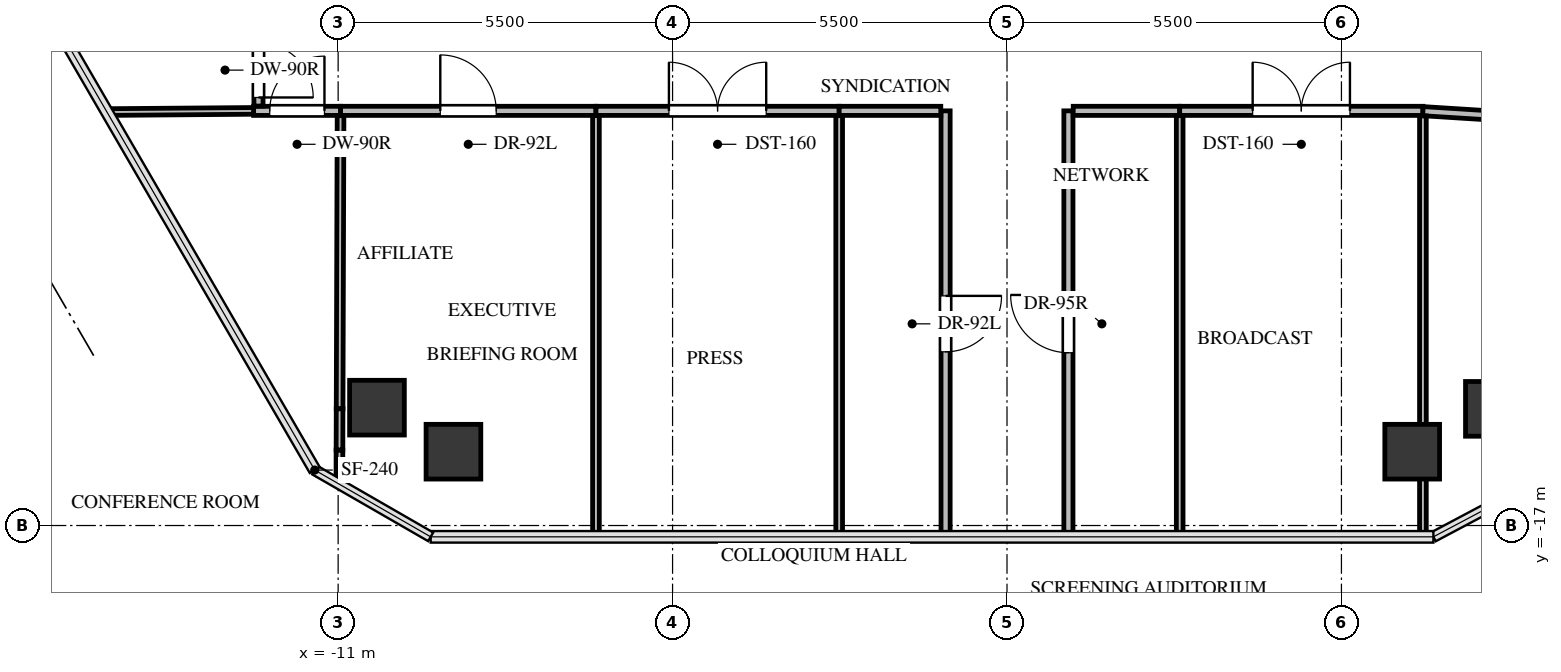
"""IFC4 building model, lengths in metres.
Left out: names, types, materials, properties, quantities, classifications, styles, units other than length and angle.
Written with IfcOpenShell. Run it as: python <this file> out.ifc"""

import sys

from ifc_helpers import new_model, si_unit, direction, frame, frame_2d, origin, origin_2d, place, context, subcontext, project, spatial, rectangle, extrude, source, transform, mapped, element, fill, save


model = new_model("IFC4")
c1 = context("Model", 3, precision=1e-05, world=origin(), true_north=direction((0.0, 1.0)))
c2 = subcontext(c1, "Body", "Model", "MODEL_VIEW")
j1 = project(units=[si_unit("LENGTHUNIT", "METRE"), si_unit("PLANEANGLEUNIT", "RADIAN")], contexts=[c1])
p1 = place(None, origin())
s1 = spatial("IfcSite", under=j1, at=p1, CompositionType="ELEMENT")
p2 = place(p1, origin())
s2 = spatial("IfcBuilding", under=s1, at=p2, CompositionType="ELEMENT")
p3 = place(p2, frame((0.0, 0.0, 244.7)))
s3 = spatial("IfcBuildingStorey", under=s2, at=p3, CompositionType="ELEMENT", Elevation=244.7)
m1 = source(origin(), c2, "Body", "SweptSolid", [
    extrude(rectangle(XDim=0.9, YDim=0.9, at=origin_2d()), origin(), (0.0, 0.0, 1.0), 3.3),
])
for number, where, z_axis, x_axis in (
    (1, (-10.361, -15.062, -0.24), (0.0, 0.0, 1.0), (1.0, 0.0, 0.0)),
    (2, (7.991, -15.081, -0.24), (0.0, 0.0, 1.0), (1.0, 0.0, 0.0)),
    (3, (6.664, -15.786, -0.24), (0.0, 0.0, 1.0), (1.0, 0.0, 0.0)),
    (4, (-9.104, -15.786, -0.24), (0.0, 0.0, 1.0), (1.0, 0.0, 0.0)),
):
    element("IfcColumn", number, at=place(p3, frame(where, z_axis=z_axis, x_axis=x_axis)), inside=s3, PredefinedType="COLUMN", context=c2, shape_type="MappedRepresentation", body=[
        mapped(m1, transform((0.0, 0.0, 0.0), x_axis=(1.0, 0.0, 0.0), y_axis=(0.0, 1.0, 0.0), z_axis=(0.0, 0.0, 1.0), scale=1.0)),
    ])
p4 = place(p3, frame((-12.39, -10.18, 0.0), z_axis=(0.0, 0.0, 1.0), x_axis=(1.0, 0.0, 0.0)))
e5 = element("IfcWall", 5, at=p4, inside=s3, PredefinedType="PARTITIONING", context=c2, shape_type="SweptSolid", body=[
    extrude(rectangle(XDim=1.43, YDim=0.15, at=frame_2d((0.715, 0.0))), origin(), (0.0, 0.0, 1.0), 3.045),
])
p5 = place(p4, frame((0.265, 0.0, 0.0)))
e6 = element("IfcOpeningElement", 6, at=p5, cuts=e5, PredefinedType="OPENING", context=c2, shape_type="SweptSolid", body=[
    extrude(rectangle(XDim=0.9, YDim=2.05, at=frame_2d((0.45, 1.025))), frame((0.0, 0.085, 0.0), z_axis=(0.0, -1.0, 0.0), x_axis=(1.0, 0.0, 0.0)), (0.0, 0.0, 1.0), 0.17),
])
p6 = place(p3, frame((-10.96, -10.18, 0.0), z_axis=(0.0, 0.0, 1.0), x_axis=(1.0, 0.0, 0.0)))
e7 = element("IfcWall", 7, at=p6, inside=s3, PredefinedType="PARTITIONING", context=c2, shape_type="SweptSolid", body=[
    extrude(rectangle(XDim=4.2, YDim=0.15, at=frame_2d((2.1, 0.0))), origin(), (0.0, 0.0, 1.0), 3.045),
])
p7 = place(p6, frame((1.64, 0.0, 0.0)))
e8 = element("IfcOpeningElement", 8, at=p7, cuts=e7, PredefinedType="OPENING", context=c2, shape_type="SweptSolid", body=[
    extrude(rectangle(XDim=0.92, YDim=2.1, at=frame_2d((0.46, 1.05))), frame((0.0, 0.085, 0.0), z_axis=(0.0, -1.0, 0.0), x_axis=(1.0, 0.0, 0.0)), (0.0, 0.0, 1.0), 0.17),
])
p8 = place(p3, frame((-6.76, -10.18, 0.0), z_axis=(0.0, 0.0, 1.0), x_axis=(1.0, 0.0, 0.0)))
e9 = element("IfcWall", 9, at=p8, inside=s3, PredefinedType="PARTITIONING", context=c2, shape_type="SweptSolid", body=[
    extrude(rectangle(XDim=4.0, YDim=0.15, at=frame_2d((2.0, 0.0))), origin(), (0.0, 0.0, 1.0), 2.301),
])
p9 = place(p8, frame((1.2, 0.0, 0.0)))
e10 = element("IfcOpeningElement", 10, at=p9, cuts=e9, PredefinedType="OPENING", context=c2, shape_type="SweptSolid", body=[
    extrude(rectangle(XDim=1.6, YDim=2.15, at=frame_2d((0.8, 1.075))), frame((0.0, 0.085, 0.0), z_axis=(0.0, -1.0, 0.0), x_axis=(1.0, 0.0, 0.0)), (0.0, 0.0, 1.0), 0.17),
])
p10 = place(p3, frame((-1.01, -10.18, 0.0), z_axis=(0.0, 0.0, 1.0), x_axis=(0.0, -1.0, 0.0)))
e11 = element("IfcWall", 11, at=p10, inside=s3, PredefinedType="PARTITIONING", context=c2, shape_type="SweptSolid", body=[
    extrude(rectangle(XDim=7.006, YDim=0.15, at=frame_2d((3.503, 0.0))), origin(), (0.0, 0.0, 1.0), 2.399),
])
p11 = place(p10, frame((3.043, 0.0, 0.0)))
e12 = element("IfcOpeningElement", 12, at=p11, cuts=e11, PredefinedType="OPENING", context=c2, shape_type="SweptSolid", body=[
    extrude(rectangle(XDim=0.92, YDim=2.1, at=frame_2d((0.46, 1.05))), frame((0.0, 0.085, 0.0), z_axis=(0.0, -1.0, 0.0), x_axis=(1.0, 0.0, 0.0)), (0.0, 0.0, 1.0), 0.17),
])
p12 = place(p3, frame((-2.76, -10.18, 0.0), z_axis=(0.0, 0.0, 1.0), x_axis=(1.0, 0.0, 0.0)))
e13 = element("IfcWall", 13, at=p12, inside=s3, PredefinedType="PARTITIONING", context=c2, shape_type="SweptSolid", body=[
    extrude(rectangle(XDim=1.671, YDim=0.15, at=frame_2d((0.835, 0.0))), origin(), (0.0, 0.0, 1.0), 3.045),
])
p13 = place(p3, frame((1.01, -17.186, 0.0), z_axis=(0.0, 0.0, 1.0), x_axis=(0.0, 1.0, 0.0)))
e14 = element("IfcWall", 14, at=p13, inside=s3, PredefinedType="PARTITIONING", context=c2, shape_type="SweptSolid", body=[
    extrude(rectangle(XDim=7.006, YDim=0.15, at=frame_2d((3.503, 0.0))), origin(), (0.0, 0.0, 1.0), 2.399),
])
p14 = place(p13, frame((3.028, 0.0, 0.0)))
e15 = element("IfcOpeningElement", 15, at=p14, cuts=e14, PredefinedType="OPENING", context=c2, shape_type="SweptSolid", body=[
    extrude(rectangle(XDim=0.95, YDim=2.1, at=frame_2d((0.475, 1.05))), frame((0.0, 0.085, 0.0), z_axis=(0.0, -1.0, 0.0), x_axis=(1.0, 0.0, 0.0)), (0.0, 0.0, 1.0), 0.17),
])
p15 = place(p3, frame((1.089, -10.18, 0.0), z_axis=(0.0, 0.0, 1.0), x_axis=(1.0, 0.0, 0.0)))
e16 = element("IfcWall", 16, at=p15, inside=s3, PredefinedType="PARTITIONING", context=c2, shape_type="SweptSolid", body=[
    extrude(rectangle(XDim=1.751, YDim=0.15, at=frame_2d((0.875, 0.0))), origin(), (0.0, 0.0, 1.0), 3.045),
])
p16 = place(p3, frame((2.84, -10.18, 0.0), z_axis=(0.0, 0.0, 1.0), x_axis=(1.0, 0.0, 0.0)))
e17 = element("IfcWall", 17, at=p16, inside=s3, PredefinedType="PARTITIONING", context=c2, shape_type="SweptSolid", body=[
    extrude(rectangle(XDim=4.0, YDim=0.15, at=frame_2d((2.0, 0.0))), origin(), (0.0, 0.0, 1.0), 2.301),
])
p17 = place(p16, frame((1.2, 0.0, 0.0)))
e18 = element("IfcOpeningElement", 18, at=p17, cuts=e17, PredefinedType="OPENING", context=c2, shape_type="SweptSolid", body=[
    extrude(rectangle(XDim=1.6, YDim=2.15, at=frame_2d((0.8, 1.075))), frame((0.0, 0.085, 0.0), z_axis=(0.0, -1.0, 0.0), x_axis=(1.0, 0.0, 0.0)), (0.0, 0.0, 1.0), 0.17),
])
p18 = place(p3, frame((6.84, -10.185, 0.0), z_axis=(0.0, 0.0, 1.0), x_axis=(0.99800894273, -0.063072579072, 0.0)))
e19 = element("IfcWall", 19, at=p18, inside=s3, PredefinedType="PARTITIONING", context=c2, shape_type="SweptSolid", body=[
    extrude(rectangle(XDim=5.911, YDim=0.15, at=frame_2d((2.955, 0.0))), origin(), (0.0, 0.0, 1.0), 2.399),
])
p19 = place(p18, frame((2.48, 0.0, 0.0)))
e20 = element("IfcOpeningElement", 20, at=p19, cuts=e19, PredefinedType="OPENING", context=c2, shape_type="SweptSolid", body=[
    extrude(rectangle(XDim=0.95, YDim=2.1, at=frame_2d((0.475, 1.05))), frame((0.0, 0.085, 0.0), z_axis=(0.0, -1.0, 0.0), x_axis=(1.0, 0.0, 0.0)), (0.0, 0.0, 1.0), 0.17),
])
p20 = place(p3, frame((-12.31, -8.919, 0.0), z_axis=(0.0, 0.0, 1.0), x_axis=(0.0, -1.0, 0.0)))
e21 = element("IfcWall", 21, at=p20, inside=s3, PredefinedType="PARTITIONING", context=c2, shape_type="SweptSolid", body=[
    extrude(rectangle(XDim=1.182, YDim=0.15, at=frame_2d((0.591, 0.0))), origin(), (0.0, 0.0, 1.0), 3.045),
])
p21 = place(p20, frame((0.141, 0.0, 0.0)))
e22 = element("IfcOpeningElement", 22, at=p21, cuts=e21, PredefinedType="OPENING", context=c2, shape_type="SweptSolid", body=[
    extrude(rectangle(XDim=0.9, YDim=2.05, at=frame_2d((0.45, 1.025))), frame((0.0, 0.085, 0.0), z_axis=(0.0, -1.0, 0.0), x_axis=(1.0, 0.0, 0.0)), (0.0, 0.0, 1.0), 0.17),
])
p22 = place(p3, frame((-10.96, -10.259, 0.0), z_axis=(0.0, 0.0, 1.0), x_axis=(-0.003240981611, -0.999994748005, 0.0)))
e23 = element("IfcWall", 23, at=p22, inside=s3, PredefinedType="MOVABLE", context=c2, shape_type="SweptSolid", body=[
    extrude(rectangle(XDim=4.821, YDim=0.11, at=frame_2d((2.411, 0.0))), origin(), (0.0, 0.0, 1.0), 2.399),
])
p23 = place(p3, frame((-10.978, -15.758, 0.0), z_axis=(0.0, 0.0, 1.0), x_axis=(-0.003467686129, -0.999993987558, 0.0)))
e24 = element("IfcWall", 24, at=p23, inside=s3, PredefinedType="MOVABLE", context=c2, shape_type="SweptSolid", body=[
    extrude(rectangle(XDim=0.563, YDim=0.11, at=frame_2d((0.282, 0.0))), origin(), (0.0, 0.0, 1.0), 3.045),
])
p24 = place(p3, frame((-10.976, -15.08, 0.0), z_axis=(0.0, 0.0, 1.0), x_axis=(-0.003242057889, -0.999994744517, 0.0)))
e25 = element("IfcWall", 25, at=p24, inside=s3, PredefinedType="MOVABLE", context=c2, shape_type="SweptSolid", body=[
    extrude(rectangle(XDim=0.678, YDim=0.11, at=frame_2d((0.339, 0.0))), origin(), (0.0, 0.0, 1.0), 1.877),
])
p25 = place(p3, frame((-14.802, -10.2, 0.0), z_axis=(0.0, 0.0, 1.0), x_axis=(0.999968020968, 0.007997314604, 0.0)))
e26 = element("IfcWall", 26, at=p25, inside=s3, PredefinedType="MOVABLE", context=c2, shape_type="SweptSolid", body=[
    extrude(rectangle(XDim=2.412, YDim=0.11, at=frame_2d((1.206, 0.0))), origin(), (0.0, 0.0, 1.0), 2.399),
])
p26 = place(p3, frame((-6.76, -10.259, 0.0), z_axis=(0.0, 0.0, 1.0), x_axis=(0.0, -1.0, 0.0)))
e27 = element("IfcWall", 27, at=p26, inside=s3, PredefinedType="MOVABLE", context=c2, shape_type="SweptSolid", body=[
    extrude(rectangle(XDim=6.927, YDim=0.11, at=frame_2d((3.463, 0.0))), origin(), (0.0, 0.0, 1.0), 2.301),
])
for number, where, z_axis, x_axis in (
    (28, (-2.76, -10.259, 0.0), (0.0, 0.0, 1.0), (0.0, -1.0, 0.0)),
    (29, (2.84, -10.259, 0.0), (0.0, 0.0, 1.0), (0.0, -1.0, 0.0)),
):
    element("IfcWall", number, at=place(p3, frame(where, z_axis=z_axis, x_axis=x_axis)), inside=s3, PredefinedType="MOVABLE", context=c2, shape_type="SweptSolid", body=[
        extrude(rectangle(XDim=6.927, YDim=0.11, at=frame_2d((3.463, 0.0))), origin(), (0.0, 0.0, 1.0), 2.399),
    ])
p27 = place(p3, frame((6.84, -10.264, 0.0), z_axis=(0.0, 0.0, 1.0), x_axis=(0.0, -1.0, 0.0)))
e30 = element("IfcWall", 30, at=p27, inside=s3, PredefinedType="MOVABLE", context=c2, shape_type="SweptSolid", body=[
    extrude(rectangle(XDim=5.606, YDim=0.11, at=frame_2d((2.803, 0.0))), origin(), (0.0, 0.0, 1.0), 2.301),
])
p28 = place(p3, frame((6.84, -15.87, 0.0), z_axis=(0.0, 0.0, 1.0), x_axis=(0.0, -1.0, 0.0)))
e31 = element("IfcWall", 31, at=p28, inside=s3, PredefinedType="MOVABLE", context=c2, shape_type="SweptSolid", body=[
    extrude(rectangle(XDim=1.316, YDim=0.11, at=frame_2d((0.658, 0.0))), origin(), (0.0, 0.0, 1.0), 1.877),
])
m2 = source(origin(), c2, "Body", "SweptSolid", [
    extrude(rectangle(XDim=0.9, YDim=2.05, at=frame_2d((0.45, 1.025))), frame((0.0, 0.025, 0.0), z_axis=(0.0, -1.0, 0.0), x_axis=(1.0, 0.0, 0.0)), (0.0, 0.0, 1.0), 0.05),
])
p29 = place(p5, origin())
e32 = element("IfcDoor", 32, at=p29, inside=s3, OperationType="SINGLE_SWING_RIGHT", PredefinedType="DOOR", context=c2, shape_type="MappedRepresentation", body=[
    mapped(m2, transform((0.0, 0.0, 0.0), x_axis=(1.0, 0.0, 0.0), y_axis=(0.0, 1.0, 0.0), z_axis=(0.0, 0.0, 1.0), scale=1.0)),
])
fill(e6, e32)
m3 = source(origin(), c2, "Body", "SweptSolid", [
    extrude(rectangle(XDim=0.92, YDim=2.1, at=frame_2d((0.46, 1.05))), frame((0.0, 0.025, 0.0), z_axis=(0.0, -1.0, 0.0), x_axis=(1.0, 0.0, 0.0)), (0.0, 0.0, 1.0), 0.05),
])
p30 = place(p7, origin())
e33 = element("IfcDoor", 33, at=p30, inside=s3, OperationType="SINGLE_SWING_LEFT", PredefinedType="DOOR", context=c2, shape_type="MappedRepresentation", body=[
    mapped(m3, transform((0.0, 0.0, 0.0), x_axis=(1.0, 0.0, 0.0), y_axis=(0.0, 1.0, 0.0), z_axis=(0.0, 0.0, 1.0), scale=1.0)),
])
fill(e8, e33)
m4 = source(origin(), c2, "Body", "SweptSolid", [
    extrude(rectangle(XDim=1.6, YDim=2.15, at=frame_2d((0.8, 1.075))), frame((0.0, 0.025, 0.0), z_axis=(0.0, -1.0, 0.0), x_axis=(1.0, 0.0, 0.0)), (0.0, 0.0, 1.0), 0.05),
])
p31 = place(p9, origin())
e34 = element("IfcDoor", 34, at=p31, inside=s3, OperationType="DOUBLE_DOOR_SINGLE_SWING", PredefinedType="DOOR", context=c2, shape_type="MappedRepresentation", body=[
    mapped(m4, transform((0.0, 0.0, 0.0), x_axis=(1.0, 0.0, 0.0), y_axis=(0.0, 1.0, 0.0), z_axis=(0.0, 0.0, 1.0), scale=1.0)),
])
fill(e10, e34)
p32 = place(p11, origin())
e35 = element("IfcDoor", 35, at=p32, inside=s3, OperationType="SINGLE_SWING_LEFT", PredefinedType="DOOR", context=c2, shape_type="MappedRepresentation", body=[
    mapped(m3, transform((0.0, 0.0, 0.0), x_axis=(1.0, 0.0, 0.0), y_axis=(0.0, 1.0, 0.0), z_axis=(0.0, 0.0, 1.0), scale=1.0)),
])
fill(e12, e35)
m5 = source(origin(), c2, "Body", "SweptSolid", [
    extrude(rectangle(XDim=0.95, YDim=2.1, at=frame_2d((0.475, 1.05))), frame((0.0, 0.025, 0.0), z_axis=(0.0, -1.0, 0.0), x_axis=(1.0, 0.0, 0.0)), (0.0, 0.0, 1.0), 0.05),
])
p33 = place(p14, origin())
e36 = element("IfcDoor", 36, at=p33, inside=s3, OperationType="SINGLE_SWING_RIGHT", PredefinedType="DOOR", context=c2, shape_type="MappedRepresentation", body=[
    mapped(m5, transform((0.0, 0.0, 0.0), x_axis=(1.0, 0.0, 0.0), y_axis=(0.0, 1.0, 0.0), z_axis=(0.0, 0.0, 1.0), scale=1.0)),
])
fill(e15, e36)
p34 = place(p17, origin())
e37 = element("IfcDoor", 37, at=p34, inside=s3, OperationType="DOUBLE_DOOR_SINGLE_SWING", PredefinedType="DOOR", context=c2, shape_type="MappedRepresentation", body=[
    mapped(m4, transform((0.0, 0.0, 0.0), x_axis=(1.0, 0.0, 0.0), y_axis=(0.0, 1.0, 0.0), z_axis=(0.0, 0.0, 1.0), scale=1.0)),
])
fill(e18, e37)
p35 = place(p21, origin())
e38 = element("IfcDoor", 38, at=p35, inside=s3, OperationType="SINGLE_SWING_RIGHT", PredefinedType="DOOR", context=c2, shape_type="MappedRepresentation", body=[
    mapped(m2, transform((0.0, 0.0, 0.0), x_axis=(1.0, 0.0, 0.0), y_axis=(0.0, 1.0, 0.0), z_axis=(0.0, 0.0, 1.0), scale=1.0)),
])
fill(e22, e38)
save(model, sys.argv[1])
